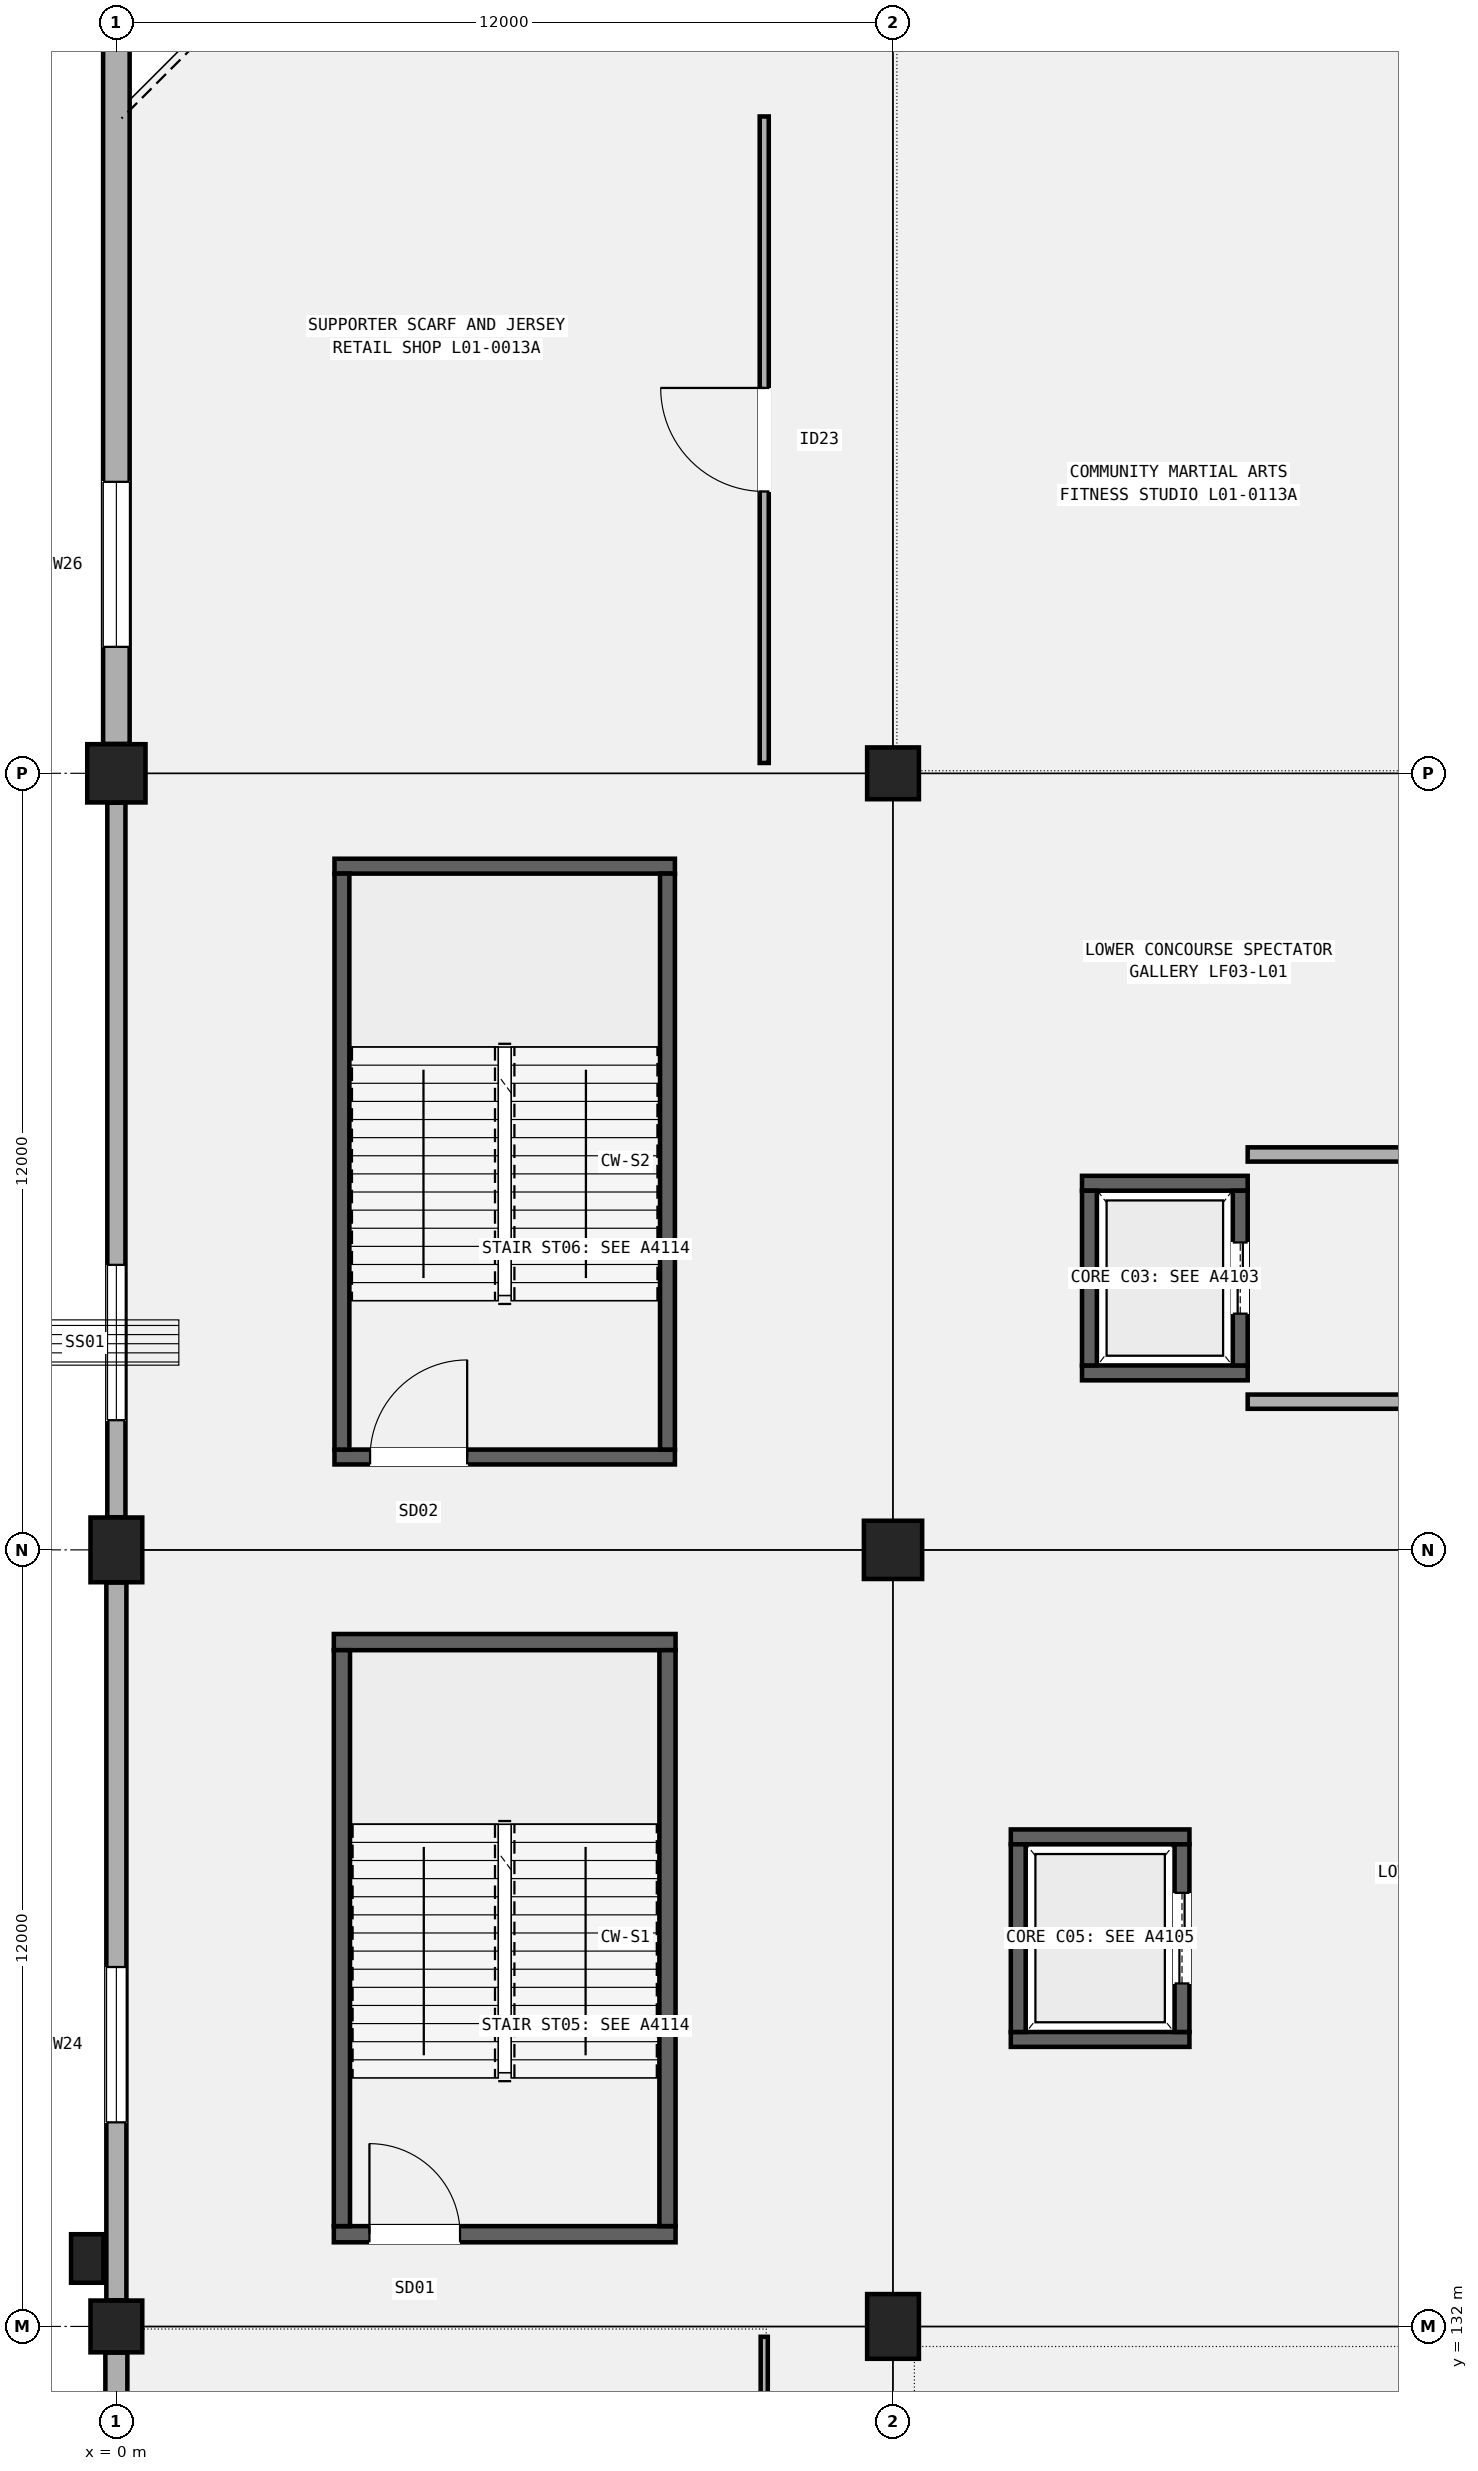
"""IFC4 building model, lengths in metres.
Left out: names, types, materials, properties, quantities, classifications, styles, units other than length and angle.
Written with IfcOpenShell. Run it as: python <this file> out.ifc"""

import sys

from ifc_helpers import new_model, si_unit, direction, frame, frame_2d, origin, origin_2d, place, context, subcontext, project, spatial, rectangle, extrude, element, fill, save


model = new_model("IFC4")
c1 = context("Model", 3, precision=1e-05, world=origin(), true_north=direction((0.0, 1.0)))
c2 = subcontext(c1, "Body", "Model", "MODEL_VIEW")
j1 = project(units=[si_unit("LENGTHUNIT", "METRE"), si_unit("PLANEANGLEUNIT", "RADIAN")], contexts=[c1])
p1 = place(None, origin())
s1 = spatial("IfcSite", under=j1, at=p1, CompositionType="ELEMENT")
p2 = place(p1, origin())
s2 = spatial("IfcBuilding", under=s1, at=p2, CompositionType="ELEMENT")
p3 = place(p2, frame((0.0, 0.0, 5.4)))
s3 = spatial("IfcBuildingStorey", under=s2, at=p3, CompositionType="ELEMENT", Elevation=5.4)
p4 = place(p3, frame((0.0, 132.0, 0.0), z_axis=(0.0, 0.0, 1.0), x_axis=(1.0, 0.0, 0.0)))
e1 = element("IfcColumn", 1, at=p4, inside=s3, PredefinedType="COLUMN", context=c2, shape_type="SweptSolid", body=[
    extrude(rectangle(XDim=0.8, YDim=0.8, at=origin_2d()), origin(), (0.0, 0.0, 1.0), 4.8),
])
p5 = place(p3, frame((0.0, 144.0, 0.0), z_axis=(0.0, 0.0, 1.0), x_axis=(1.0, 0.0, 0.0)))
e2 = element("IfcColumn", 2, at=p5, inside=s3, PredefinedType="COLUMN", context=c2, shape_type="SweptSolid", body=[
    extrude(rectangle(XDim=0.8, YDim=1.0, at=origin_2d()), origin(), (0.0, 0.0, 1.0), 4.8),
])
p6 = place(p3, frame((0.0, 156.0, 0.0), z_axis=(0.0, 0.0, 1.0), x_axis=(1.0, 0.0, 0.0)))
e3 = element("IfcColumn", 3, at=p6, inside=s3, PredefinedType="COLUMN", context=c2, shape_type="SweptSolid", body=[
    extrude(rectangle(XDim=0.9, YDim=0.9, at=origin_2d()), origin(), (0.0, 0.0, 1.0), 4.8),
])
p7 = place(p3, frame((12.0, 132.0, 0.0), z_axis=(0.0, 0.0, 1.0), x_axis=(1.0, 0.0, 0.0)))
e4 = element("IfcColumn", 4, at=p7, inside=s3, PredefinedType="COLUMN", context=c2, shape_type="SweptSolid", body=[
    extrude(rectangle(XDim=0.8, YDim=1.0, at=origin_2d()), origin(), (0.0, 0.0, 1.0), 4.8),
])
p8 = place(p3, frame((12.0, 144.0, 0.0), z_axis=(0.0, 0.0, 1.0), x_axis=(1.0, 0.0, 0.0)))
e5 = element("IfcColumn", 5, at=p8, inside=s3, PredefinedType="COLUMN", context=c2, shape_type="SweptSolid", body=[
    extrude(rectangle(XDim=0.9, YDim=0.9, at=origin_2d()), origin(), (0.0, 0.0, 1.0), 4.8),
])
p9 = place(p3, frame((12.0, 156.0, 0.0), z_axis=(0.0, 0.0, 1.0), x_axis=(1.0, 0.0, 0.0)))
e6 = element("IfcColumn", 6, at=p9, inside=s3, PredefinedType="COLUMN", context=c2, shape_type="SweptSolid", body=[
    extrude(rectangle(XDim=0.8, YDim=0.8, at=origin_2d()), origin(), (0.0, 0.0, 1.0), 4.8),
])
p10 = place(p3, frame((-0.45, 133.05, 0.0), z_axis=(0.0, 0.0, 1.0), x_axis=(1.0, 0.0, 0.0)))
e7 = element("IfcColumn", 7, at=p10, inside=s3, PredefinedType="PILASTER", context=c2, shape_type="SweptSolid", body=[
    extrude(rectangle(XDim=0.5, YDim=0.75, at=origin_2d()), origin(), (0.0, 0.0, 1.0), 4.8),
])
p11 = place(p3, frame((0.0, 120.454, 0.0), z_axis=(0.0, 0.0, 1.0), x_axis=(0.0, 1.0, 0.0)))
e8 = element("IfcWall", 8, at=p11, inside=s3, PredefinedType="SOLIDWALL", context=c2, shape_type="SweptSolid", body=[
    extrude(rectangle(XDim=11.142, YDim=0.34, at=frame_2d((5.571, 0.0))), origin(), (0.0, 0.0, 1.0), 4.15),
])
p12 = place(p11, frame((1.5, 0.0, 0.95)))
e9 = element("IfcOpeningElement", 9, at=p12, cuts=e8, PredefinedType="OPENING", context=c2, shape_type="SweptSolid", body=[
    extrude(rectangle(XDim=2.4, YDim=1.65, at=frame_2d((1.2, 0.825))), frame((0.0, 0.18, 0.0), z_axis=(0.0, -1.0, 0.0), x_axis=(1.0, 0.0, 0.0)), (0.0, 0.0, 1.0), 0.36),
])
p13 = place(p3, frame((0.0, 132.404, 0.0), z_axis=(0.0, 0.0, 1.0), x_axis=(0.0, 1.0, 0.0)))
e10 = element("IfcWall", 10, at=p13, inside=s3, PredefinedType="SOLIDWALL", context=c2, shape_type="SweptSolid", body=[
    extrude(rectangle(XDim=11.092, YDim=0.31, at=frame_2d((5.546, 0.0))), origin(), (0.0, 0.0, 1.0), 4.2),
])
p14 = place(p13, frame((2.75, 0.0, 0.95)))
e11 = element("IfcOpeningElement", 11, at=p14, cuts=e10, PredefinedType="OPENING", context=c2, shape_type="SweptSolid", body=[
    extrude(rectangle(XDim=2.4, YDim=2.05, at=frame_2d((1.2, 1.025))), frame((0.0, 0.165, 0.0), z_axis=(0.0, -1.0, 0.0), x_axis=(1.0, 0.0, 0.0)), (0.0, 0.0, 1.0), 0.33),
])
p15 = place(p3, frame((0.0, 144.504, 0.0), z_axis=(0.0, 0.0, 1.0), x_axis=(0.0, 1.0, 0.0)))
e12 = element("IfcWall", 12, at=p15, inside=s3, PredefinedType="SOLIDWALL", context=c2, shape_type="SweptSolid", body=[
    extrude(rectangle(XDim=11.042, YDim=0.28, at=frame_2d((5.521, 0.0))), origin(), (0.0, 0.0, 1.0), 4.15),
])
p16 = place(p15, frame((1.5, 0.0, 0.95)))
e13 = element("IfcOpeningElement", 13, at=p16, cuts=e12, PredefinedType="OPENING", context=c2, shape_type="SweptSolid", body=[
    extrude(rectangle(XDim=2.4, YDim=2.45, at=frame_2d((1.2, 1.225))), frame((0.0, 0.15, 0.0), z_axis=(0.0, -1.0, 0.0), x_axis=(1.0, 0.0, 0.0)), (0.0, 0.0, 1.0), 0.3),
])
p17 = place(p3, frame((0.0, 156.454, 0.0), z_axis=(0.0, 0.0, 1.0), x_axis=(0.0, 1.0, 0.0)))
e14 = element("IfcWall", 14, at=p17, inside=s3, PredefinedType="SOLIDWALL", context=c2, shape_type="SweptSolid", body=[
    extrude(rectangle(XDim=11.142, YDim=0.41, at=frame_2d((5.571, 0.0))), origin(), (0.0, 0.0, 1.0), 4.2),
])
p18 = place(p17, frame((1.5, 0.0, 0.95)))
e15 = element("IfcOpeningElement", 15, at=p18, cuts=e14, PredefinedType="OPENING", context=c2, shape_type="SweptSolid", body=[
    extrude(rectangle(XDim=2.55, YDim=1.95, at=frame_2d((1.275, 0.975))), frame((0.0, 0.215, 0.0), z_axis=(0.0, -1.0, 0.0), x_axis=(1.0, 0.0, 0.0)), (0.0, 0.0, 1.0), 0.43),
])
p19 = place(p3, frame((3.36, 133.425, 0.0), z_axis=(0.0, 0.0, 1.0), x_axis=(1.0, 0.0, 0.0)))
e16 = element("IfcWall", 16, at=p19, inside=s3, PredefinedType="SHEAR", context=c2, shape_type="SweptSolid", body=[
    extrude(rectangle(XDim=5.28, YDim=0.25, at=frame_2d((2.64, 0.0))), origin(), (0.0, 0.0, 1.0), 4.55),
])
p20 = place(p19, frame((0.55, 0.0, 0.0)))
e17 = element("IfcOpeningElement", 17, at=p20, cuts=e16, PredefinedType="OPENING", context=c2, shape_type="SweptSolid", body=[
    extrude(rectangle(XDim=1.4, YDim=2.15, at=frame_2d((0.7, 1.075))), frame((0.0, 0.135, 0.0), z_axis=(0.0, -1.0, 0.0), x_axis=(1.0, 0.0, 0.0)), (0.0, 0.0, 1.0), 0.27),
])
p21 = place(p3, frame((3.36, 142.575, 0.0), z_axis=(0.0, 0.0, 1.0), x_axis=(1.0, 0.0, 0.0)))
e18 = element("IfcWall", 18, at=p21, inside=s3, PredefinedType="SHEAR", context=c2, shape_type="SweptSolid", body=[
    extrude(rectangle(XDim=5.28, YDim=0.25, at=frame_2d((2.64, 0.0))), origin(), (0.0, 0.0, 1.0), 4.55),
])
for number, where, z_axis, x_axis in (
    (19, (3.485, 133.55, 0.0), (0.0, 0.0, 1.0), (0.0, 1.0, 0.0)),
    (20, (8.515, 133.55, 0.0), (0.0, 0.0, 1.0), (0.0, 1.0, 0.0)),
):
    element("IfcWall", number, at=place(p3, frame(where, z_axis=z_axis, x_axis=x_axis)), inside=s3, PredefinedType="SHEAR", context=c2, shape_type="SweptSolid", body=[
        extrude(rectangle(XDim=8.9, YDim=0.25, at=frame_2d((4.45, 0.0))), origin(), (0.0, 0.0, 1.0), 4.55),
    ])
p22 = place(p3, frame((3.37, 145.435, 0.0), z_axis=(0.0, 0.0, 1.0), x_axis=(1.0, 0.0, 0.0)))
e21 = element("IfcWall", 21, at=p22, inside=s3, PredefinedType="SHEAR", context=c2, shape_type="SweptSolid", body=[
    extrude(rectangle(XDim=5.26, YDim=0.23, at=frame_2d((2.63, 0.0))), origin(), (0.0, 0.0, 1.0), 4.55),
])
p23 = place(p22, frame((0.55, 0.0, 0.0)))
e22 = element("IfcOpeningElement", 22, at=p23, cuts=e21, PredefinedType="OPENING", context=c2, shape_type="SweptSolid", body=[
    extrude(rectangle(XDim=1.5, YDim=2.2, at=frame_2d((0.75, 1.1))), frame((0.0, 0.125, 0.0), z_axis=(0.0, -1.0, 0.0), x_axis=(1.0, 0.0, 0.0)), (0.0, 0.0, 1.0), 0.25),
])
p24 = place(p3, frame((3.37, 154.565, 0.0), z_axis=(0.0, 0.0, 1.0), x_axis=(1.0, 0.0, 0.0)))
e23 = element("IfcWall", 23, at=p24, inside=s3, PredefinedType="SHEAR", context=c2, shape_type="SweptSolid", body=[
    extrude(rectangle(XDim=5.26, YDim=0.23, at=frame_2d((2.63, 0.0))), origin(), (0.0, 0.0, 1.0), 4.55),
])
for number, where, z_axis, x_axis in (
    (24, (3.485, 145.55, 0.0), (0.0, 0.0, 1.0), (0.0, 1.0, 0.0)),
    (25, (8.515, 145.55, 0.0), (0.0, 0.0, 1.0), (0.0, 1.0, 0.0)),
):
    element("IfcWall", number, at=place(p3, frame(where, z_axis=z_axis, x_axis=x_axis)), inside=s3, PredefinedType="SHEAR", context=c2, shape_type="SweptSolid", body=[
        extrude(rectangle(XDim=8.9, YDim=0.23, at=frame_2d((4.45, 0.0))), origin(), (0.0, 0.0, 1.0), 4.55),
    ])
for number, where, z_axis, x_axis in (
    (26, (14.92, 146.735, 0.0), (0.0, 0.0, 1.0), (1.0, 0.0, 0.0)),
    (27, (14.92, 149.665, 0.0), (0.0, 0.0, 1.0), (1.0, 0.0, 0.0)),
):
    element("IfcWall", number, at=place(p3, frame(where, z_axis=z_axis, x_axis=x_axis)), inside=s3, PredefinedType="SHEAR", context=c2, shape_type="SweptSolid", body=[
        extrude(rectangle(XDim=2.56, YDim=0.23, at=frame_2d((1.28, 0.0))), origin(), (0.0, 0.0, 1.0), 4.55),
    ])
p25 = place(p3, frame((15.035, 146.85, 0.0), z_axis=(0.0, 0.0, 1.0), x_axis=(0.0, 1.0, 0.0)))
e28 = element("IfcWall", 28, at=p25, inside=s3, PredefinedType="SHEAR", context=c2, shape_type="SweptSolid", body=[
    extrude(rectangle(XDim=2.7, YDim=0.23, at=frame_2d((1.35, 0.0))), origin(), (0.0, 0.0, 1.0), 4.55),
])
p26 = place(p3, frame((17.365, 146.85, 0.0), z_axis=(0.0, 0.0, 1.0), x_axis=(0.0, 1.0, 0.0)))
e29 = element("IfcWall", 29, at=p26, inside=s3, PredefinedType="SHEAR", context=c2, shape_type="SweptSolid", body=[
    extrude(rectangle(XDim=2.7, YDim=0.23, at=frame_2d((1.35, 0.0))), origin(), (0.0, 0.0, 1.0), 4.55),
])
p27 = place(p26, frame((0.8, 0.0, 0.0)))
e30 = element("IfcOpeningElement", 30, at=p27, cuts=e29, PredefinedType="OPENING", context=c2, shape_type="SweptSolid", body=[
    extrude(rectangle(XDim=1.1, YDim=2.15, at=frame_2d((0.55, 1.075))), frame((0.0, 0.125, 0.0), z_axis=(0.0, -1.0, 0.0), x_axis=(1.0, 0.0, 0.0)), (0.0, 0.0, 1.0), 0.25),
])
for number, where, z_axis, x_axis in (
    (31, (17.48, 146.29, 0.0), (0.0, 0.0, 1.0), (1.0, 0.0, 0.0)),
    (32, (17.48, 150.11, 0.0), (0.0, 0.0, 1.0), (1.0, 0.0, 0.0)),
):
    element("IfcWall", number, at=place(p3, frame(where, z_axis=z_axis, x_axis=x_axis)), inside=s3, PredefinedType="SOLIDWALL", context=c2, shape_type="SweptSolid", body=[
        extrude(rectangle(XDim=4.29, YDim=0.22, at=frame_2d((2.145, 0.0))), origin(), (0.0, 0.0, 1.0), 3.92),
    ])
for number, where, z_axis, x_axis in (
    (33, (13.82, 136.435, 0.0), (0.0, 0.0, 1.0), (1.0, 0.0, 0.0)),
    (34, (13.82, 139.565, 0.0), (0.0, 0.0, 1.0), (1.0, 0.0, 0.0)),
):
    element("IfcWall", number, at=place(p3, frame(where, z_axis=z_axis, x_axis=x_axis)), inside=s3, PredefinedType="SHEAR", context=c2, shape_type="SweptSolid", body=[
        extrude(rectangle(XDim=2.76, YDim=0.23, at=frame_2d((1.38, 0.0))), origin(), (0.0, 0.0, 1.0), 4.55),
    ])
p28 = place(p3, frame((13.935, 136.55, 0.0), z_axis=(0.0, 0.0, 1.0), x_axis=(0.0, 1.0, 0.0)))
e35 = element("IfcWall", 35, at=p28, inside=s3, PredefinedType="SHEAR", context=c2, shape_type="SweptSolid", body=[
    extrude(rectangle(XDim=2.9, YDim=0.23, at=frame_2d((1.45, 0.0))), origin(), (0.0, 0.0, 1.0), 4.55),
])
p29 = place(p3, frame((16.465, 136.55, 0.0), z_axis=(0.0, 0.0, 1.0), x_axis=(0.0, 1.0, 0.0)))
e36 = element("IfcWall", 36, at=p29, inside=s3, PredefinedType="SHEAR", context=c2, shape_type="SweptSolid", body=[
    extrude(rectangle(XDim=2.9, YDim=0.23, at=frame_2d((1.45, 0.0))), origin(), (0.0, 0.0, 1.0), 4.55),
])
p30 = place(p29, frame((0.75, 0.0, 0.0)))
e37 = element("IfcOpeningElement", 37, at=p30, cuts=e36, PredefinedType="OPENING", context=c2, shape_type="SweptSolid", body=[
    extrude(rectangle(XDim=1.4, YDim=2.25, at=frame_2d((0.7, 1.125))), frame((0.0, 0.125, 0.0), z_axis=(0.0, -1.0, 0.0), x_axis=(1.0, 0.0, 0.0)), (0.0, 0.0, 1.0), 0.25),
])
p31 = place(p3, frame((10.01, 120.16, 0.0), z_axis=(0.0, 0.0, 1.0), x_axis=(0.0, 1.0, 0.0)))
e38 = element("IfcWall", 38, at=p31, inside=s3, PredefinedType="PARTITIONING", context=c2, shape_type="SweptSolid", body=[
    extrude(rectangle(XDim=11.68, YDim=0.11, at=frame_2d((5.84, 0.0))), origin(), (0.0, 0.0, 1.0), 3.92),
])
p32 = place(p31, frame((5.06, 0.0, 0.0)))
e39 = element("IfcOpeningElement", 39, at=p32, cuts=e38, PredefinedType="OPENING", context=c2, shape_type="SweptSolid", body=[
    extrude(rectangle(XDim=1.56, YDim=2.26, at=frame_2d((0.78, 1.13))), frame((0.0, 0.065, 0.0), z_axis=(0.0, -1.0, 0.0), x_axis=(1.0, 0.0, 0.0)), (0.0, 0.0, 1.0), 0.13),
])
p33 = place(p3, frame((10.01, 156.16, 0.0), z_axis=(0.0, 0.0, 1.0), x_axis=(0.0, 1.0, 0.0)))
e40 = element("IfcWall", 40, at=p33, inside=s3, PredefinedType="PARTITIONING", context=c2, shape_type="SweptSolid", body=[
    extrude(rectangle(XDim=9.99, YDim=0.14, at=frame_2d((4.995, 0.0))), origin(), (0.0, 0.0, 1.0), 3.92),
])
p34 = place(p33, frame((4.195, 0.0, 0.0)))
e41 = element("IfcOpeningElement", 41, at=p34, cuts=e40, PredefinedType="OPENING", context=c2, shape_type="SweptSolid", body=[
    extrude(rectangle(XDim=1.6, YDim=2.3, at=frame_2d((0.8, 1.15))), frame((0.0, 0.08, 0.0), z_axis=(0.0, -1.0, 0.0), x_axis=(1.0, 0.0, 0.0)), (0.0, 0.0, 1.0), 0.16),
])
p35 = place(p14, origin())
e42 = element("IfcWindow", 42, at=p35, inside=s3, PartitioningType="SINGLE_PANEL", PredefinedType="WINDOW", context=c2, shape_type="SweptSolid", body=[
    extrude(rectangle(XDim=2.4, YDim=2.05, at=frame_2d((1.2, 1.025))), frame((0.0, 0.03, 0.0), z_axis=(0.0, -1.0, 0.0), x_axis=(1.0, 0.0, 0.0)), (0.0, 0.0, 1.0), 0.06),
])
fill(e11, e42)
p36 = place(p16, origin())
e43 = element("IfcWindow", 43, at=p36, inside=s3, PartitioningType="SINGLE_PANEL", PredefinedType="WINDOW", context=c2, shape_type="SweptSolid", body=[
    extrude(rectangle(XDim=2.4, YDim=2.45, at=frame_2d((1.2, 1.225))), frame((0.0, 0.03, 0.0), z_axis=(0.0, -1.0, 0.0), x_axis=(1.0, 0.0, 0.0)), (0.0, 0.0, 1.0), 0.06),
])
fill(e13, e43)
p37 = place(p18, origin())
e44 = element("IfcWindow", 44, at=p37, inside=s3, PartitioningType="SINGLE_PANEL", PredefinedType="WINDOW", context=c2, shape_type="SweptSolid", body=[
    extrude(rectangle(XDim=2.55, YDim=1.95, at=frame_2d((1.275, 0.975))), frame((0.0, 0.03, 0.0), z_axis=(0.0, -1.0, 0.0), x_axis=(1.0, 0.0, 0.0)), (0.0, 0.0, 1.0), 0.06),
])
fill(e15, e44)
p38 = place(p20, origin())
e45 = element("IfcDoor", 45, at=p38, inside=s3, OperationType="SINGLE_SWING_LEFT", PredefinedType="DOOR", context=c2, shape_type="SweptSolid", body=[
    extrude(rectangle(XDim=1.4, YDim=2.15, at=frame_2d((0.7, 1.075))), frame((0.0, 0.025, 0.0), z_axis=(0.0, -1.0, 0.0), x_axis=(1.0, 0.0, 0.0)), (0.0, 0.0, 1.0), 0.05),
])
fill(e17, e45)
p39 = place(p23, origin())
e46 = element("IfcDoor", 46, at=p39, inside=s3, OperationType="SINGLE_SWING_RIGHT", PredefinedType="DOOR", context=c2, shape_type="SweptSolid", body=[
    extrude(rectangle(XDim=1.5, YDim=2.2, at=frame_2d((0.75, 1.1))), frame((0.0, 0.025, 0.0), z_axis=(0.0, -1.0, 0.0), x_axis=(1.0, 0.0, 0.0)), (0.0, 0.0, 1.0), 0.05),
])
fill(e22, e46)
p40 = place(p27, origin())
e47 = element("IfcDoor", 47, at=p40, inside=s3, OperationType="DOUBLE_DOOR_SLIDING", PredefinedType="DOOR", context=c2, shape_type="SweptSolid", body=[
    extrude(rectangle(XDim=1.1, YDim=2.15, at=frame_2d((0.55, 1.075))), frame((0.0, 0.025, 0.0), z_axis=(0.0, -1.0, 0.0), x_axis=(1.0, 0.0, 0.0)), (0.0, 0.0, 1.0), 0.05),
])
fill(e30, e47)
p41 = place(p30, origin())
e48 = element("IfcDoor", 48, at=p41, inside=s3, OperationType="DOUBLE_DOOR_SLIDING", PredefinedType="DOOR", context=c2, shape_type="SweptSolid", body=[
    extrude(rectangle(XDim=1.4, YDim=2.25, at=frame_2d((0.7, 1.125))), frame((0.0, 0.025, 0.0), z_axis=(0.0, -1.0, 0.0), x_axis=(1.0, 0.0, 0.0)), (0.0, 0.0, 1.0), 0.05),
])
fill(e37, e48)
p42 = place(p34, origin())
e49 = element("IfcDoor", 49, at=p42, inside=s3, OperationType="SINGLE_SWING_RIGHT", PredefinedType="DOOR", context=c2, shape_type="SweptSolid", body=[
    extrude(rectangle(XDim=1.6, YDim=2.3, at=frame_2d((0.8, 1.15))), frame((0.0, 0.025, 0.0), z_axis=(0.0, -1.0, 0.0), x_axis=(1.0, 0.0, 0.0)), (0.0, 0.0, 1.0), 0.05),
])
fill(e41, e49)
save(model, sys.argv[1])
